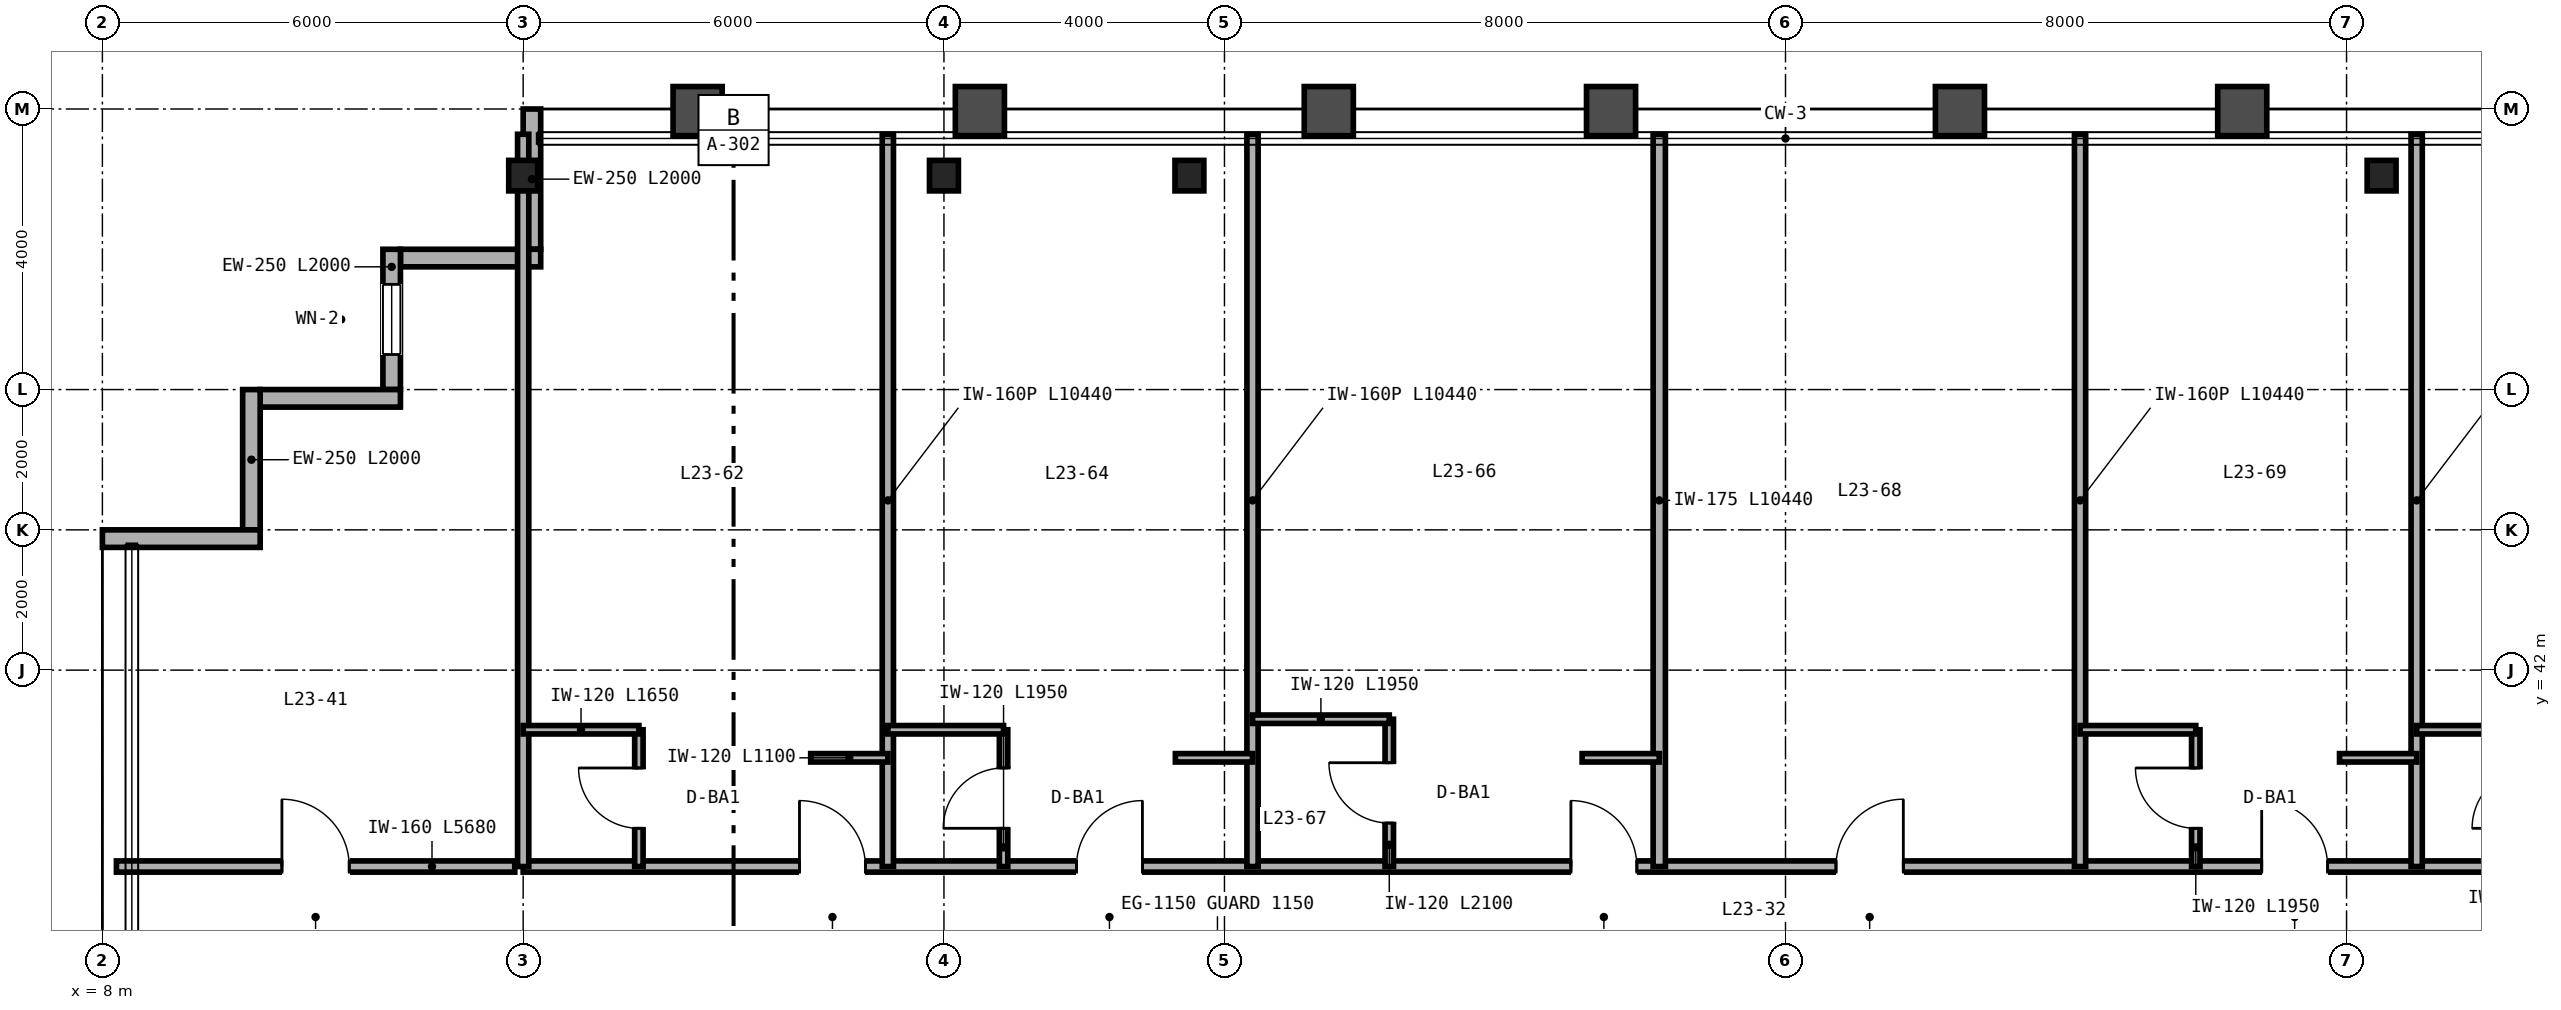
"""IFC4 building model, lengths in metres.
Left out: names, types, materials, properties, quantities, classifications, styles, units other than length and angle.
Written with IfcOpenShell. Run it as: python <this file> out.ifc"""

import sys

from ifc_helpers import new_model, si_unit, direction, frame, frame_2d, origin, origin_2d, place, context, subcontext, project, spatial, rectangle, i_section, extrude, source, transform, mapped, element, fill, save


model = new_model("IFC4")
c1 = context("Model", 3, precision=1e-05, world=origin(), true_north=direction((0.0, 1.0)))
c2 = subcontext(c1, "Body", "Model", "MODEL_VIEW")
j1 = project(units=[si_unit("LENGTHUNIT", "METRE"), si_unit("PLANEANGLEUNIT", "RADIAN")], contexts=[c1])
p1 = place(None, origin())
s1 = spatial("IfcSite", under=j1, at=p1, CompositionType="ELEMENT")
p2 = place(p1, origin())
s2 = spatial("IfcBuilding", under=s1, at=p2, CompositionType="ELEMENT")
p3 = place(p2, frame((0.0, 0.0, 97.2)))
s3 = spatial("IfcBuildingStorey", under=s2, at=p3, CompositionType="ELEMENT", Elevation=97.2)
m1 = source(origin(), c2, "Body", "SweptSolid", [
    extrude(i_section(OverallWidth=0.412, OverallDepth=0.435, WebThickness=0.036, FlangeThickness=0.057, FilletRadius=0.025, at=origin_2d()), origin(), (0.0, 0.0, 1.0), 3.36),
])
for number, where, z_axis, x_axis in (
    (1, (14.0, 49.05, 0.0), (0.0, 0.0, 1.0), (1.0, 0.0, 0.0)),
    (2, (20.0, 49.05, 0.0), (0.0, 0.0, 1.0), (1.0, 0.0, 0.0)),
    (3, (23.5, 49.05, 0.0), (0.0, 0.0, 1.0), (1.0, 0.0, 0.0)),
    (4, (40.5, 49.05, 0.0), (0.0, 0.0, 1.0), (1.0, 0.0, 0.0)),
):
    element("IfcColumn", number, at=place(p3, frame(where, z_axis=z_axis, x_axis=x_axis)), inside=s3, PredefinedType="COLUMN", context=c2, shape_type="MappedRepresentation", body=[
        mapped(m1, transform((0.0, 0.0, 0.0), scale=1.0)),
    ])
p4 = place(p3, frame((14.125, 50.0, 0.0), z_axis=(0.0, 0.0, 1.0), x_axis=(0.0, -1.0, 0.0)))
e5 = element("IfcWall", 5, at=p4, inside=s3, PredefinedType="SOLIDWALL", context=c2, shape_type="SweptSolid", body=[
    extrude(rectangle(XDim=2.0, YDim=0.25, at=frame_2d((1.0, 0.0))), origin(), (0.0, 0.0, 1.0), 2.667),
])
p5 = place(p3, frame((14.25, 47.875, 0.0), z_axis=(0.0, 0.0, 1.0), x_axis=(-1.0, 0.0, 0.0)))
e6 = element("IfcWall", 6, at=p5, inside=s3, PredefinedType="SOLIDWALL", context=c2, shape_type="SweptSolid", body=[
    extrude(rectangle(XDim=2.0, YDim=0.25, at=frame_2d((1.0, 0.0))), origin(), (0.0, 0.0, 1.0), 3.36),
])
p6 = place(p3, frame((12.125, 48.0, 0.0), z_axis=(0.0, 0.0, 1.0), x_axis=(0.0, -1.0, 0.0)))
e7 = element("IfcWall", 7, at=p6, inside=s3, PredefinedType="SOLIDWALL", context=c2, shape_type="SweptSolid", body=[
    extrude(rectangle(XDim=2.0, YDim=0.25, at=frame_2d((1.0, 0.0))), origin(), (0.0, 0.0, 1.0), 3.36),
])
p7 = place(p6, frame((0.5, 0.0, 0.85)))
e8 = element("IfcOpeningElement", 8, at=p7, cuts=e7, PredefinedType="OPENING", context=c2, shape_type="SweptSolid", body=[
    extrude(rectangle(XDim=1.0, YDim=1.9, at=frame_2d((0.5, 0.95))), frame((0.0, 0.135, 0.0), z_axis=(0.0, -1.0, 0.0), x_axis=(1.0, 0.0, 0.0)), (0.0, 0.0, 1.0), 0.27),
])
for number, where, z_axis, x_axis in (
    (9, (12.25, 45.875, 0.0), (0.0, 0.0, 1.0), (-1.0, 0.0, 0.0)),
    (10, (10.125, 46.0, 0.0), (0.0, 0.0, 1.0), (0.0, -1.0, 0.0)),
):
    element("IfcWall", number, at=place(p3, frame(where, z_axis=z_axis, x_axis=x_axis)), inside=s3, PredefinedType="SOLIDWALL", context=c2, shape_type="SweptSolid", body=[
        extrude(rectangle(XDim=2.0, YDim=0.25, at=frame_2d((1.0, 0.0))), origin(), (0.0, 0.0, 1.0), 3.36),
    ])
p8 = place(p3, frame((10.25, 43.875, 0.0), z_axis=(0.0, 0.0, 1.0), x_axis=(-1.0, 0.0, 0.0)))
e11 = element("IfcWall", 11, at=p8, inside=s3, PredefinedType="SOLIDWALL", context=c2, shape_type="SweptSolid", body=[
    extrude(rectangle(XDim=2.25, YDim=0.25, at=frame_2d((1.125, 0.0))), origin(), (0.0, 0.0, 1.0), 3.36),
])
p9 = place(p3, frame((8.2, 39.2, 0.0), z_axis=(0.0, 0.0, 1.0), x_axis=(1.0, 0.0, 0.0)))
e12 = element("IfcWall", 12, at=p9, inside=s3, PredefinedType="PARTITIONING", context=c2, shape_type="SweptSolid", body=[
    extrude(rectangle(XDim=5.68, YDim=0.16, at=frame_2d((2.84, 0.0))), origin(), (0.0, 0.0, 1.0), 3.36),
])
p10 = place(p9, frame((2.36, 0.0, 0.0)))
e13 = element("IfcOpeningElement", 13, at=p10, cuts=e12, PredefinedType="OPENING", context=c2, shape_type="SweptSolid", body=[
    extrude(rectangle(XDim=0.96, YDim=2.15, at=frame_2d((0.48, 1.075))), frame((0.0, 0.09, 0.0), z_axis=(0.0, -1.0, 0.0), x_axis=(1.0, 0.0, 0.0)), (0.0, 0.0, 1.0), 0.18),
])
p11 = place(p3, frame((14.0, 39.2, 0.0), z_axis=(0.0, 0.0, 1.0), x_axis=(1.0, 0.0, 0.0)))
e14 = element("IfcWall", 14, at=p11, inside=s3, PredefinedType="PARTITIONING", context=c2, shape_type="SweptSolid", body=[
    extrude(rectangle(XDim=36.0, YDim=0.16, at=frame_2d((18.0, 0.0))), origin(), (0.0, 0.0, 1.0), 2.581),
])
p12 = place(p11, frame((3.94, 0.0, 0.0)))
e15 = element("IfcOpeningElement", 15, at=p12, cuts=e14, PredefinedType="OPENING", context=c2, shape_type="SweptSolid", body=[
    extrude(rectangle(XDim=0.94, YDim=2.15, at=frame_2d((0.47, 1.075))), frame((0.0, 0.09, 0.0), z_axis=(0.0, -1.0, 0.0), x_axis=(1.0, 0.0, 0.0)), (0.0, 0.0, 1.0), 0.18),
])
p13 = place(p11, frame((7.89, 0.0, 0.0)))
e16 = element("IfcOpeningElement", 16, at=p13, cuts=e14, PredefinedType="OPENING", context=c2, shape_type="SweptSolid", body=[
    extrude(rectangle(XDim=0.94, YDim=2.15, at=frame_2d((0.47, 1.075))), frame((0.0, 0.09, 0.0), z_axis=(0.0, -1.0, 0.0), x_axis=(1.0, 0.0, 0.0)), (0.0, 0.0, 1.0), 0.18),
])
p14 = place(p11, frame((14.94, 0.0, 0.0)))
e17 = element("IfcOpeningElement", 17, at=p14, cuts=e14, PredefinedType="OPENING", context=c2, shape_type="SweptSolid", body=[
    extrude(rectangle(XDim=0.94, YDim=2.15, at=frame_2d((0.47, 1.075))), frame((0.0, 0.09, 0.0), z_axis=(0.0, -1.0, 0.0), x_axis=(1.0, 0.0, 0.0)), (0.0, 0.0, 1.0), 0.18),
])
p15 = place(p11, frame((18.72, 0.0, 0.0)))
e18 = element("IfcOpeningElement", 18, at=p15, cuts=e14, PredefinedType="OPENING", context=c2, shape_type="SweptSolid", body=[
    extrude(rectangle(XDim=0.96, YDim=2.15, at=frame_2d((0.48, 1.075))), frame((0.0, 0.09, 0.0), z_axis=(0.0, -1.0, 0.0), x_axis=(1.0, 0.0, 0.0)), (0.0, 0.0, 1.0), 0.18),
])
p16 = place(p11, frame((24.79, 0.0, 0.0)))
e19 = element("IfcOpeningElement", 19, at=p16, cuts=e14, PredefinedType="OPENING", context=c2, shape_type="SweptSolid", body=[
    extrude(rectangle(XDim=0.94, YDim=2.15, at=frame_2d((0.47, 1.075))), frame((0.0, 0.09, 0.0), z_axis=(0.0, -1.0, 0.0), x_axis=(1.0, 0.0, 0.0)), (0.0, 0.0, 1.0), 0.18),
])
p17 = place(p11, frame((30.34, 0.0, 0.0)))
e20 = element("IfcOpeningElement", 20, at=p17, cuts=e14, PredefinedType="OPENING", context=c2, shape_type="SweptSolid", body=[
    extrude(rectangle(XDim=0.94, YDim=2.15, at=frame_2d((0.47, 1.075))), frame((0.0, 0.09, 0.0), z_axis=(0.0, -1.0, 0.0), x_axis=(1.0, 0.0, 0.0)), (0.0, 0.0, 1.0), 0.18),
])
p18 = place(p11, frame((34.74, 0.0, 0.0)))
e21 = element("IfcOpeningElement", 21, at=p18, cuts=e14, PredefinedType="OPENING", context=c2, shape_type="SweptSolid", body=[
    extrude(rectangle(XDim=0.94, YDim=2.15, at=frame_2d((0.47, 1.075))), frame((0.0, 0.09, 0.0), z_axis=(0.0, -1.0, 0.0), x_axis=(1.0, 0.0, 0.0)), (0.0, 0.0, 1.0), 0.18),
])
for number, where, z_axis, x_axis in (
    (22, (14.0, 39.2, 0.0), (0.0, 0.0, 1.0), (0.0, 1.0, 0.0)),
    (23, (19.2, 39.2, 0.0), (0.0, 0.0, 1.0), (0.0, 1.0, 0.0)),
):
    element("IfcWall", number, at=place(p3, frame(where, z_axis=z_axis, x_axis=x_axis)), inside=s3, PredefinedType="PARTITIONING", context=c2, shape_type="SweptSolid", body=[
        extrude(rectangle(XDim=10.44, YDim=0.16, at=frame_2d((5.22, 0.0))), origin(), (0.0, 0.0, 1.0), 2.667),
    ])
p19 = place(p3, frame((15.65, 39.2, 0.0), z_axis=(0.0, 0.0, 1.0), x_axis=(0.0, 1.0, 0.0)))
e24 = element("IfcWall", 24, at=p19, inside=s3, PredefinedType="PARTITIONING", context=c2, shape_type="SweptSolid", body=[
    extrude(rectangle(XDim=1.95, YDim=0.12, at=frame_2d((0.975, 0.0))), origin(), (0.0, 0.0, 1.0), 3.36),
])
p20 = place(p19, frame((0.545, 0.0, 0.0)))
e25 = element("IfcOpeningElement", 25, at=p20, cuts=e24, PredefinedType="OPENING", context=c2, shape_type="SweptSolid", body=[
    extrude(rectangle(XDim=0.86, YDim=2.1, at=frame_2d((0.43, 1.05))), frame((0.0, 0.07, 0.0), z_axis=(0.0, -1.0, 0.0), x_axis=(1.0, 0.0, 0.0)), (0.0, 0.0, 1.0), 0.14),
])
p21 = place(p3, frame((14.0, 41.15, 0.0), z_axis=(0.0, 0.0, 1.0), x_axis=(1.0, 0.0, 0.0)))
e26 = element("IfcWall", 26, at=p21, inside=s3, PredefinedType="PARTITIONING", context=c2, shape_type="SweptSolid", body=[
    extrude(rectangle(XDim=1.65, YDim=0.12, at=frame_2d((0.825, 0.0))), origin(), (0.0, 0.0, 1.0), 3.36),
])
p22 = place(p3, frame((18.1, 40.75, 0.0), z_axis=(0.0, 0.0, 1.0), x_axis=(1.0, 0.0, 0.0)))
e27 = element("IfcWall", 27, at=p22, inside=s3, PredefinedType="PARTITIONING", context=c2, shape_type="SweptSolid", body=[
    extrude(rectangle(XDim=1.1, YDim=0.12, at=frame_2d((0.55, 0.0))), origin(), (0.0, 0.0, 1.0), 3.36),
])
p23 = place(p3, frame((24.4, 39.2, 0.0), z_axis=(0.0, 0.0, 1.0), x_axis=(0.0, 1.0, 0.0)))
e28 = element("IfcWall", 28, at=p23, inside=s3, PredefinedType="PARTITIONING", context=c2, shape_type="SweptSolid", body=[
    extrude(rectangle(XDim=10.44, YDim=0.16, at=frame_2d((5.22, 0.0))), origin(), (0.0, 0.0, 1.0), 2.433),
])
p24 = place(p3, frame((20.85, 39.2, 0.0), z_axis=(0.0, 0.0, 1.0), x_axis=(0.0, 1.0, 0.0)))
e29 = element("IfcWall", 29, at=p24, inside=s3, PredefinedType="PARTITIONING", context=c2, shape_type="SweptSolid", body=[
    extrude(rectangle(XDim=1.95, YDim=0.12, at=frame_2d((0.975, 0.0))), origin(), (0.0, 0.0, 1.0), 3.36),
])
p25 = place(p24, frame((0.545, 0.0, 0.0)))
e30 = element("IfcOpeningElement", 30, at=p25, cuts=e29, PredefinedType="OPENING", context=c2, shape_type="SweptSolid", body=[
    extrude(rectangle(XDim=0.86, YDim=2.1, at=frame_2d((0.43, 1.05))), frame((0.0, 0.07, 0.0), z_axis=(0.0, -1.0, 0.0), x_axis=(1.0, 0.0, 0.0)), (0.0, 0.0, 1.0), 0.14),
])
p26 = place(p3, frame((19.2, 41.15, 0.0), z_axis=(0.0, 0.0, 1.0), x_axis=(1.0, 0.0, 0.0)))
e31 = element("IfcWall", 31, at=p26, inside=s3, PredefinedType="PARTITIONING", context=c2, shape_type="SweptSolid", body=[
    extrude(rectangle(XDim=1.65, YDim=0.12, at=frame_2d((0.825, 0.0))), origin(), (0.0, 0.0, 1.0), 3.36),
])
p27 = place(p3, frame((23.3, 40.75, 0.0), z_axis=(0.0, 0.0, 1.0), x_axis=(1.0, 0.0, 0.0)))
e32 = element("IfcWall", 32, at=p27, inside=s3, PredefinedType="PARTITIONING", context=c2, shape_type="SweptSolid", body=[
    extrude(rectangle(XDim=1.1, YDim=0.12, at=frame_2d((0.55, 0.0))), origin(), (0.0, 0.0, 1.0), 2.581),
])
p28 = place(p3, frame((30.2, 39.2, 0.0), z_axis=(0.0, 0.0, 1.0), x_axis=(0.0, 1.0, 0.0)))
e33 = element("IfcWall", 33, at=p28, inside=s3, PredefinedType="PARTITIONING", context=c2, shape_type="SweptSolid", body=[
    extrude(rectangle(XDim=10.44, YDim=0.175, at=frame_2d((5.22, 0.0))), origin(), (0.0, 0.0, 1.0), 2.433),
])
p29 = place(p3, frame((26.35, 39.2, 0.0), z_axis=(0.0, 0.0, 1.0), x_axis=(0.0, 1.0, 0.0)))
e34 = element("IfcWall", 34, at=p29, inside=s3, PredefinedType="PARTITIONING", context=c2, shape_type="SweptSolid", body=[
    extrude(rectangle(XDim=2.1, YDim=0.12, at=frame_2d((1.05, 0.0))), origin(), (0.0, 0.0, 1.0), 3.36),
])
p30 = place(p29, frame((0.62, 0.0, 0.0)))
e35 = element("IfcOpeningElement", 35, at=p30, cuts=e34, PredefinedType="OPENING", context=c2, shape_type="SweptSolid", body=[
    extrude(rectangle(XDim=0.86, YDim=2.1, at=frame_2d((0.43, 1.05))), frame((0.0, 0.07, 0.0), z_axis=(0.0, -1.0, 0.0), x_axis=(1.0, 0.0, 0.0)), (0.0, 0.0, 1.0), 0.14),
])
p31 = place(p3, frame((24.4, 41.3, 0.0), z_axis=(0.0, 0.0, 1.0), x_axis=(1.0, 0.0, 0.0)))
e36 = element("IfcWall", 36, at=p31, inside=s3, PredefinedType="PARTITIONING", context=c2, shape_type="SweptSolid", body=[
    extrude(rectangle(XDim=1.95, YDim=0.12, at=frame_2d((0.975, 0.0))), origin(), (0.0, 0.0, 1.0), 3.36),
])
p32 = place(p3, frame((29.1, 40.75, 0.0), z_axis=(0.0, 0.0, 1.0), x_axis=(1.0, 0.0, 0.0)))
e37 = element("IfcWall", 37, at=p32, inside=s3, PredefinedType="PARTITIONING", context=c2, shape_type="SweptSolid", body=[
    extrude(rectangle(XDim=1.1, YDim=0.12, at=frame_2d((0.55, 0.0))), origin(), (0.0, 0.0, 1.0), 3.36),
])
p33 = place(p3, frame((36.2, 39.2, 0.0), z_axis=(0.0, 0.0, 1.0), x_axis=(0.0, 1.0, 0.0)))
e38 = element("IfcWall", 38, at=p33, inside=s3, PredefinedType="PARTITIONING", context=c2, shape_type="SweptSolid", body=[
    extrude(rectangle(XDim=10.44, YDim=0.16, at=frame_2d((5.22, 0.0))), origin(), (0.0, 0.0, 1.0), 2.433),
])
p34 = place(p3, frame((41.0, 39.2, 0.0), z_axis=(0.0, 0.0, 1.0), x_axis=(0.0, 1.0, 0.0)))
e39 = element("IfcWall", 39, at=p34, inside=s3, PredefinedType="PARTITIONING", context=c2, shape_type="SweptSolid", body=[
    extrude(rectangle(XDim=10.44, YDim=0.16, at=frame_2d((5.22, 0.0))), origin(), (0.0, 0.0, 1.0), 2.823),
])
p35 = place(p3, frame((37.85, 39.2, 0.0), z_axis=(0.0, 0.0, 1.0), x_axis=(0.0, 1.0, 0.0)))
e40 = element("IfcWall", 40, at=p35, inside=s3, PredefinedType="PARTITIONING", context=c2, shape_type="SweptSolid", body=[
    extrude(rectangle(XDim=1.95, YDim=0.12, at=frame_2d((0.975, 0.0))), origin(), (0.0, 0.0, 1.0), 3.36),
])
p36 = place(p35, frame((0.545, 0.0, 0.0)))
e41 = element("IfcOpeningElement", 41, at=p36, cuts=e40, PredefinedType="OPENING", context=c2, shape_type="SweptSolid", body=[
    extrude(rectangle(XDim=0.86, YDim=2.1, at=frame_2d((0.43, 1.05))), frame((0.0, 0.07, 0.0), z_axis=(0.0, -1.0, 0.0), x_axis=(1.0, 0.0, 0.0)), (0.0, 0.0, 1.0), 0.14),
])
p37 = place(p3, frame((36.2, 41.15, 0.0), z_axis=(0.0, 0.0, 1.0), x_axis=(1.0, 0.0, 0.0)))
e42 = element("IfcWall", 42, at=p37, inside=s3, PredefinedType="PARTITIONING", context=c2, shape_type="SweptSolid", body=[
    extrude(rectangle(XDim=1.65, YDim=0.12, at=frame_2d((0.825, 0.0))), origin(), (0.0, 0.0, 1.0), 3.36),
])
p38 = place(p3, frame((39.9, 40.75, 0.0), z_axis=(0.0, 0.0, 1.0), x_axis=(1.0, 0.0, 0.0)))
e43 = element("IfcWall", 43, at=p38, inside=s3, PredefinedType="PARTITIONING", context=c2, shape_type="SweptSolid", body=[
    extrude(rectangle(XDim=1.1, YDim=0.12, at=frame_2d((0.55, 0.0))), origin(), (0.0, 0.0, 1.0), 2.581),
])
p39 = place(p3, frame((41.0, 41.15, 0.0), z_axis=(0.0, 0.0, 1.0), x_axis=(1.0, 0.0, 0.0)))
e44 = element("IfcWall", 44, at=p39, inside=s3, PredefinedType="PARTITIONING", context=c2, shape_type="SweptSolid", body=[
    extrude(rectangle(XDim=1.65, YDim=0.12, at=frame_2d((0.825, 0.0))), origin(), (0.0, 0.0, 1.0), 3.36),
])
m2 = source(origin(), c2, "Body", "SweptSolid", [
    extrude(rectangle(XDim=1.0, YDim=1.9, at=frame_2d((0.5, 0.95))), frame((0.0, 0.03, 0.0), z_axis=(0.0, -1.0, 0.0), x_axis=(1.0, 0.0, 0.0)), (0.0, 0.0, 1.0), 0.06),
])
p40 = place(p7, origin())
e45 = element("IfcWindow", 45, at=p40, inside=s3, PartitioningType="SINGLE_PANEL", PredefinedType="WINDOW", context=c2, shape_type="MappedRepresentation", body=[
    mapped(m2, transform((0.0, 0.0, 0.0), scale=1.0)),
])
fill(e8, e45)
m3 = source(origin(), c2, "Body", "SweptSolid", [
    extrude(rectangle(XDim=0.96, YDim=2.15, at=frame_2d((0.48, 1.075))), frame((0.0, 0.025, 0.0), z_axis=(0.0, -1.0, 0.0), x_axis=(1.0, 0.0, 0.0)), (0.0, 0.0, 1.0), 0.05),
])
p41 = place(p10, origin())
e46 = element("IfcDoor", 46, at=p41, inside=s3, OperationType="SINGLE_SWING_LEFT", PredefinedType="DOOR", context=c2, shape_type="MappedRepresentation", body=[
    mapped(m3, transform((0.0, 0.0, 0.0), scale=1.0)),
])
fill(e13, e46)
m4 = source(origin(), c2, "Body", "SweptSolid", [
    extrude(rectangle(XDim=0.86, YDim=2.1, at=frame_2d((0.43, 1.05))), frame((0.0, 0.025, 0.0), z_axis=(0.0, -1.0, 0.0), x_axis=(1.0, 0.0, 0.0)), (0.0, 0.0, 1.0), 0.05),
])
p42 = place(p20, origin())
e47 = element("IfcDoor", 47, at=p42, inside=s3, OperationType="SINGLE_SWING_RIGHT", PredefinedType="DOOR", context=c2, shape_type="MappedRepresentation", body=[
    mapped(m4, transform((0.0, 0.0, 0.0), scale=1.0)),
])
fill(e25, e47)
p43 = place(p25, origin())
e48 = element("IfcDoor", 48, at=p43, inside=s3, OperationType="SINGLE_SWING_LEFT", PredefinedType="DOOR", context=c2, shape_type="MappedRepresentation", body=[
    mapped(m4, transform((0.0, 0.0, 0.0), scale=1.0)),
])
fill(e30, e48)
p44 = place(p30, origin())
e49 = element("IfcDoor", 49, at=p44, inside=s3, OperationType="SINGLE_SWING_RIGHT", PredefinedType="DOOR", context=c2, shape_type="MappedRepresentation", body=[
    mapped(m4, transform((0.0, 0.0, 0.0), scale=1.0)),
])
fill(e35, e49)
p45 = place(p36, origin())
e50 = element("IfcDoor", 50, at=p45, inside=s3, OperationType="SINGLE_SWING_RIGHT", PredefinedType="DOOR", context=c2, shape_type="MappedRepresentation", body=[
    mapped(m4, transform((0.0, 0.0, 0.0), scale=1.0)),
])
fill(e41, e50)
m5 = source(origin(), c2, "Body", "SweptSolid", [
    extrude(rectangle(XDim=0.94, YDim=2.15, at=frame_2d((0.47, 1.075))), frame((0.0, 0.025, 0.0), z_axis=(0.0, -1.0, 0.0), x_axis=(1.0, 0.0, 0.0)), (0.0, 0.0, 1.0), 0.05),
])
p46 = place(p12, origin())
e51 = element("IfcDoor", 51, at=p46, inside=s3, OperationType="SINGLE_SWING_LEFT", PredefinedType="DOOR", context=c2, shape_type="MappedRepresentation", body=[
    mapped(m5, transform((0.0, 0.0, 0.0), scale=1.0)),
])
fill(e15, e51)
p47 = place(p13, origin())
e52 = element("IfcDoor", 52, at=p47, inside=s3, OperationType="SINGLE_SWING_RIGHT", PredefinedType="DOOR", context=c2, shape_type="MappedRepresentation", body=[
    mapped(m5, transform((0.0, 0.0, 0.0), scale=1.0)),
])
fill(e16, e52)
p48 = place(p14, origin())
e53 = element("IfcDoor", 53, at=p48, inside=s3, OperationType="SINGLE_SWING_LEFT", PredefinedType="DOOR", context=c2, shape_type="MappedRepresentation", body=[
    mapped(m5, transform((0.0, 0.0, 0.0), scale=1.0)),
])
fill(e17, e53)
p49 = place(p15, origin())
e54 = element("IfcDoor", 54, at=p49, inside=s3, OperationType="SINGLE_SWING_RIGHT", PredefinedType="DOOR", context=c2, shape_type="MappedRepresentation", body=[
    mapped(m3, transform((0.0, 0.0, 0.0), scale=1.0)),
])
fill(e18, e54)
p50 = place(p16, origin())
e55 = element("IfcDoor", 55, at=p50, inside=s3, OperationType="SINGLE_SWING_LEFT", PredefinedType="DOOR", context=c2, shape_type="MappedRepresentation", body=[
    mapped(m5, transform((0.0, 0.0, 0.0), scale=1.0)),
])
fill(e19, e55)
save(model, sys.argv[1])
